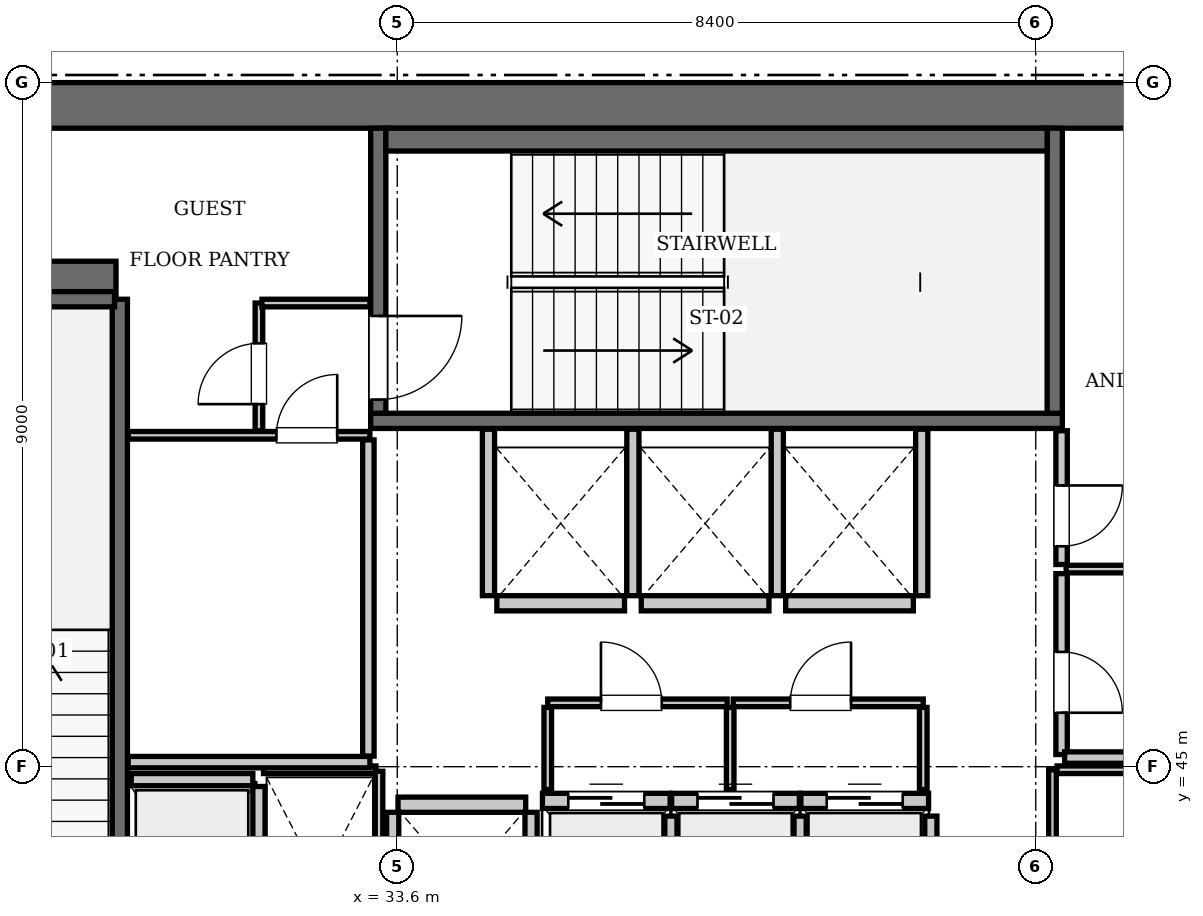
"""IFC4 building model, lengths in metres.
Left out: names, types, materials, properties, quantities, classifications, styles, units other than length and angle.
Written with IfcOpenShell. Run it as: python <this file> out.ifc"""

import sys

from ifc_helpers import new_model, si_unit, direction, frame, frame_2d, origin, place, context, subcontext, project, spatial, rectangle, extrude, element, fill, save


model = new_model("IFC4")
c1 = context("Model", 3, precision=1e-05, world=origin(), true_north=direction((0.0, 1.0)))
c2 = subcontext(c1, "Body", "Model", "MODEL_VIEW")
j1 = project(units=[si_unit("LENGTHUNIT", "METRE"), si_unit("PLANEANGLEUNIT", "RADIAN")], contexts=[c1])
p1 = place(None, origin())
s1 = spatial("IfcSite", under=j1, at=p1, CompositionType="ELEMENT")
p2 = place(p1, origin())
s2 = spatial("IfcBuilding", under=s1, at=p2, CompositionType="ELEMENT")
p3 = place(p2, frame((0.0, 0.0, 289.45)))
s3 = spatial("IfcBuildingStorey", under=s2, at=p3, CompositionType="ELEMENT", Elevation=289.45)
p4 = place(p3, frame((25.2, 53.7, 0.0), z_axis=(0.0, 0.0, 1.0), x_axis=(1.0, 0.0, 0.0)))
e1 = element("IfcWall", 1, at=p4, inside=s3, PredefinedType="SHEAR", context=c2, shape_type="SweptSolid", body=[
    extrude(rectangle(XDim=25.2, YDim=0.6, at=frame_2d((12.6, 0.0))), origin(), (0.0, 0.0, 1.0), 3.85),
])
p5 = place(p3, frame((25.8, 51.4, 0.0), z_axis=(0.0, 0.0, 1.0), x_axis=(1.0, 0.0, 0.0)))
e2 = element("IfcWall", 2, at=p5, inside=s3, PredefinedType="SHEAR", context=c2, shape_type="SweptSolid", body=[
    extrude(rectangle(XDim=4.1, YDim=0.5, at=frame_2d((2.05, 0.0))), origin(), (0.0, 0.0, 1.0), 3.85),
])
p6 = place(p3, frame((29.95, 42.0, 0.0), z_axis=(0.0, 0.0, 1.0), x_axis=(0.0, 1.0, 0.0)))
e3 = element("IfcWall", 3, at=p6, inside=s3, PredefinedType="SOLIDWALL", context=c2, shape_type="SweptSolid", body=[
    extrude(rectangle(XDim=9.15, YDim=0.2, at=frame_2d((4.575, 0.0))), origin(), (0.0, 0.0, 1.0), 3.61),
])
p7 = place(p3, frame((26.38, 51.15, 0.0), z_axis=(0.0, 0.0, 1.0), x_axis=(1.0, 0.0, 0.0)))
e4 = element("IfcWall", 4, at=p7, inside=s3, PredefinedType="SOLIDWALL", context=c2, shape_type="SweptSolid", body=[
    extrude(rectangle(XDim=3.5, YDim=0.2, at=frame_2d((1.75, 0.0))), origin(), (0.0, 0.0, 1.0), 3.61),
])
p8 = place(p3, frame((33.25, 49.55, 0.0), z_axis=(0.0, 0.0, 1.0), x_axis=(1.0, 0.0, 0.0)))
e5 = element("IfcWall", 5, at=p8, inside=s3, PredefinedType="SOLIDWALL", context=c2, shape_type="SweptSolid", body=[
    extrude(rectangle(XDim=9.1, YDim=0.2, at=frame_2d((4.55, 0.0))), origin(), (0.0, 0.0, 1.0), 3.61),
])
p9 = place(p3, frame((42.25, 49.65, 0.0), z_axis=(0.0, 0.0, 1.0), x_axis=(0.0, 1.0, 0.0)))
e6 = element("IfcWall", 6, at=p9, inside=s3, PredefinedType="SOLIDWALL", context=c2, shape_type="SweptSolid", body=[
    extrude(rectangle(XDim=3.75, YDim=0.2, at=frame_2d((1.875, 0.0))), origin(), (0.0, 0.0, 1.0), 3.61),
])
p10 = place(p3, frame((33.35, 49.65, 0.0), z_axis=(0.0, 0.0, 1.0), x_axis=(0.0, 1.0, 0.0)))
e7 = element("IfcWall", 7, at=p10, inside=s3, PredefinedType="SOLIDWALL", context=c2, shape_type="SweptSolid", body=[
    extrude(rectangle(XDim=3.75, YDim=0.2, at=frame_2d((1.875, 0.0))), origin(), (0.0, 0.0, 1.0), 3.61),
])
p11 = place(p10, frame((0.18, 0.0, 0.0)))
e8 = element("IfcOpeningElement", 8, at=p11, cuts=e7, PredefinedType="OPENING", context=c2, shape_type="SweptSolid", body=[
    extrude(rectangle(XDim=1.1, YDim=2.15, at=frame_2d((0.55, 1.075))), frame((0.0, 0.11, 0.0), z_axis=(0.0, -1.0, 0.0), x_axis=(1.0, 0.0, 0.0)), (0.0, 0.0, 1.0), 0.22),
])
p12 = place(p3, frame((33.45, 53.25, 0.0), z_axis=(0.0, 0.0, 1.0), x_axis=(1.0, 0.0, 0.0)))
e9 = element("IfcWall", 9, at=p12, inside=s3, PredefinedType="SOLIDWALL", context=c2, shape_type="SweptSolid", body=[
    extrude(rectangle(XDim=8.7, YDim=0.3, at=frame_2d((4.35, 0.0))), origin(), (0.0, 0.0, 1.0), 3.61),
])
p13 = place(p3, frame((35.51, 44.55, 0.0), z_axis=(0.0, 0.0, 1.0), x_axis=(1.0, 0.0, 0.0)))
e10 = element("IfcWall", 10, at=p13, inside=s3, PredefinedType="SOLIDWALL", context=c2, shape_type="SweptSolid", body=[
    extrude(rectangle(XDim=1.68, YDim=0.2, at=frame_2d((0.84, 0.0))), origin(), (0.0, 0.0, 1.0), 3.61),
])
p14 = place(p13, frame((0.34, 0.0, 0.0)))
e11 = element("IfcOpeningElement", 11, at=p14, cuts=e10, PredefinedType="OPENING", context=c2, shape_type="SweptSolid", body=[
    extrude(rectangle(XDim=1.0, YDim=2.15, at=frame_2d((0.5, 1.075))), frame((0.0, 0.11, 0.0), z_axis=(0.0, -1.0, 0.0), x_axis=(1.0, 0.0, 0.0)), (0.0, 0.0, 1.0), 0.22),
])
p15 = place(p3, frame((37.21, 44.55, 0.0), z_axis=(0.0, 0.0, 1.0), x_axis=(1.0, 0.0, 0.0)))
e12 = element("IfcWall", 12, at=p15, inside=s3, PredefinedType="SOLIDWALL", context=c2, shape_type="SweptSolid", body=[
    extrude(rectangle(XDim=1.68, YDim=0.2, at=frame_2d((0.84, 0.0))), origin(), (0.0, 0.0, 1.0), 3.61),
])
p16 = place(p15, frame((0.34, 0.0, 0.0)))
e13 = element("IfcOpeningElement", 13, at=p16, cuts=e12, PredefinedType="OPENING", context=c2, shape_type="SweptSolid", body=[
    extrude(rectangle(XDim=1.0, YDim=2.15, at=frame_2d((0.5, 1.075))), frame((0.0, 0.11, 0.0), z_axis=(0.0, -1.0, 0.0), x_axis=(1.0, 0.0, 0.0)), (0.0, 0.0, 1.0), 0.22),
])
p17 = place(p3, frame((38.91, 44.55, 0.0), z_axis=(0.0, 0.0, 1.0), x_axis=(1.0, 0.0, 0.0)))
e14 = element("IfcWall", 14, at=p17, inside=s3, PredefinedType="SOLIDWALL", context=c2, shape_type="SweptSolid", body=[
    extrude(rectangle(XDim=1.68, YDim=0.2, at=frame_2d((0.84, 0.0))), origin(), (0.0, 0.0, 1.0), 3.61),
])
p18 = place(p17, frame((0.34, 0.0, 0.0)))
e15 = element("IfcOpeningElement", 15, at=p18, cuts=e14, PredefinedType="OPENING", context=c2, shape_type="SweptSolid", body=[
    extrude(rectangle(XDim=1.0, YDim=2.15, at=frame_2d((0.5, 1.075))), frame((0.0, 0.11, 0.0), z_axis=(0.0, -1.0, 0.0), x_axis=(1.0, 0.0, 0.0)), (0.0, 0.0, 1.0), 0.22),
])
p19 = place(p3, frame((34.91, 47.15, 0.0), z_axis=(0.0, 0.0, 1.0), x_axis=(1.0, 0.0, 0.0)))
e16 = element("IfcWall", 16, at=p19, inside=s3, PredefinedType="SOLIDWALL", context=c2, shape_type="SweptSolid", body=[
    extrude(rectangle(XDim=1.68, YDim=0.2, at=frame_2d((0.84, 0.0))), origin(), (0.0, 0.0, 1.0), 3.61),
])
for number, where, z_axis, x_axis in (
    (17, (36.81, 47.15, 0.0), (0.0, 0.0, 1.0), (1.0, 0.0, 0.0)),
    (18, (38.71, 47.15, 0.0), (0.0, 0.0, 1.0), (1.0, 0.0, 0.0)),
    (19, (33.61, 44.5, 0.0), (0.0, 0.0, 1.0), (1.0, 0.0, 0.0)),
):
    element("IfcWall", number, at=place(p3, frame(where, z_axis=z_axis, x_axis=x_axis)), inside=s3, PredefinedType="SOLIDWALL", context=c2, shape_type="SweptSolid", body=[
        extrude(rectangle(XDim=1.68, YDim=0.2, at=frame_2d((0.84, 0.0))), origin(), (0.0, 0.0, 1.0), 3.61),
    ])
p20 = place(p3, frame((30.1, 44.83, 0.0), z_axis=(0.0, 0.0, 1.0), x_axis=(1.0, 0.0, 0.0)))
e20 = element("IfcWall", 20, at=p20, inside=s3, PredefinedType="SOLIDWALL", context=c2, shape_type="SweptSolid", body=[
    extrude(rectangle(XDim=1.6, YDim=0.16, at=frame_2d((0.8, 0.0))), origin(), (0.0, 0.0, 1.0), 3.61),
])
p21 = place(p3, frame((31.78, 42.0, 0.0), z_axis=(0.0, 0.0, 1.0), x_axis=(0.0, 1.0, 0.0)))
e21 = element("IfcWall", 21, at=p21, inside=s3, PredefinedType="SOLIDWALL", context=c2, shape_type="SweptSolid", body=[
    extrude(rectangle(XDim=2.74, YDim=0.16, at=frame_2d((1.37, 0.0))), origin(), (0.0, 0.0, 1.0), 3.61),
])
for number, where, z_axis, x_axis in (
    (22, (37.2, 42.0, 0.0), (0.0, 0.0, 1.0), (0.0, 1.0, 0.0)),
    (23, (38.9, 42.0, 0.0), (0.0, 0.0, 1.0), (0.0, 1.0, 0.0)),
    (24, (40.62, 42.0, 0.0), (0.0, 0.0, 1.0), (0.0, 1.0, 0.0)),
):
    element("IfcWall", number, at=place(p3, frame(where, z_axis=z_axis, x_axis=x_axis)), inside=s3, PredefinedType="SOLIDWALL", context=c2, shape_type="SweptSolid", body=[
        extrude(rectangle(XDim=2.35, YDim=0.16, at=frame_2d((1.175, 0.0))), origin(), (0.0, 0.0, 1.0), 3.61),
    ])
for number, where, z_axis, x_axis in (
    (25, (34.8, 47.25, 0.0), (0.0, 0.0, 1.0), (0.0, 1.0, 0.0)),
    (26, (36.7, 47.25, 0.0), (0.0, 0.0, 1.0), (0.0, 1.0, 0.0)),
    (27, (38.6, 47.25, 0.0), (0.0, 0.0, 1.0), (0.0, 1.0, 0.0)),
    (28, (40.5, 47.25, 0.0), (0.0, 0.0, 1.0), (0.0, 1.0, 0.0)),
):
    element("IfcWall", number, at=place(p3, frame(where, z_axis=z_axis, x_axis=x_axis)), inside=s3, PredefinedType="SOLIDWALL", context=c2, shape_type="SweptSolid", body=[
        extrude(rectangle(XDim=2.19, YDim=0.16, at=frame_2d((1.095, 0.0))), origin(), (0.0, 0.0, 1.0), 3.61),
    ])
for number, where, z_axis, x_axis in (
    (29, (33.54, 42.0, 0.0), (0.0, 0.0, 1.0), (0.0, 1.0, 0.0)),
    (30, (35.36, 42.0, 0.0), (0.0, 0.0, 1.0), (0.0, 1.0, 0.0)),
):
    element("IfcWall", number, at=place(p3, frame(where, z_axis=z_axis, x_axis=x_axis)), inside=s3, PredefinedType="SOLIDWALL", context=c2, shape_type="SweptSolid", body=[
        extrude(rectangle(XDim=2.4, YDim=0.16, at=frame_2d((1.2, 0.0))), origin(), (0.0, 0.0, 1.0), 3.61),
    ])
p22 = place(p3, frame((31.84, 44.96, 0.0), z_axis=(0.0, 0.0, 1.0), x_axis=(1.0, 0.0, 0.0)))
e31 = element("IfcWall", 31, at=p22, inside=s3, PredefinedType="PARTITIONING", context=c2, shape_type="SweptSolid", body=[
    extrude(rectangle(XDim=1.48, YDim=0.1, at=frame_2d((0.74, 0.0))), origin(), (0.0, 0.0, 1.0), 3.61),
])
p23 = place(p3, frame((33.36, 42.06, 0.0), z_axis=(0.0, 0.0, 1.0), x_axis=(0.0, 1.0, 0.0)))
e32 = element("IfcWall", 32, at=p23, inside=s3, PredefinedType="PARTITIONING", context=c2, shape_type="SweptSolid", body=[
    extrude(rectangle(XDim=2.88, YDim=0.1, at=frame_2d((1.44, 0.0))), origin(), (0.0, 0.0, 1.0), 3.61),
])
p24 = place(p3, frame((35.58, 45.84, 0.0), z_axis=(0.0, 0.0, 1.0), x_axis=(1.0, 0.0, 0.0)))
e33 = element("IfcWall", 33, at=p24, inside=s3, PredefinedType="PARTITIONING", context=c2, shape_type="SweptSolid", body=[
    extrude(rectangle(XDim=2.36, YDim=0.1, at=frame_2d((1.18, 0.0))), origin(), (0.0, 0.0, 1.0), 3.61),
])
p25 = place(p24, frame((0.7, 0.0, 0.0)))
e34 = element("IfcOpeningElement", 34, at=p25, cuts=e33, PredefinedType="OPENING", context=c2, shape_type="SweptSolid", body=[
    extrude(rectangle(XDim=0.8, YDim=2.05, at=frame_2d((0.4, 1.025))), frame((0.0, 0.06, 0.0), z_axis=(0.0, -1.0, 0.0), x_axis=(1.0, 0.0, 0.0)), (0.0, 0.0, 1.0), 0.12),
])
p26 = place(p3, frame((38.02, 45.84, 0.0), z_axis=(0.0, 0.0, 1.0), x_axis=(1.0, 0.0, 0.0)))
e35 = element("IfcWall", 35, at=p26, inside=s3, PredefinedType="PARTITIONING", context=c2, shape_type="SweptSolid", body=[
    extrude(rectangle(XDim=2.5, YDim=0.1, at=frame_2d((1.25, 0.0))), origin(), (0.0, 0.0, 1.0), 3.61),
])
p27 = place(p26, frame((0.75, 0.0, 0.0)))
e36 = element("IfcOpeningElement", 36, at=p27, cuts=e35, PredefinedType="OPENING", context=c2, shape_type="SweptSolid", body=[
    extrude(rectangle(XDim=0.8, YDim=2.05, at=frame_2d((0.4, 1.025))), frame((0.0, 0.06, 0.0), z_axis=(0.0, -1.0, 0.0), x_axis=(1.0, 0.0, 0.0)), (0.0, 0.0, 1.0), 0.12),
])
for number, where, z_axis, x_axis in (
    (37, (35.58, 44.7, 0.0), (0.0, 0.0, 1.0), (0.0, 1.0, 0.0)),
    (38, (37.98, 44.7, 0.0), (0.0, 0.0, 1.0), (0.0, 1.0, 0.0)),
    (39, (40.52, 44.7, 0.0), (0.0, 0.0, 1.0), (0.0, 1.0, 0.0)),
):
    element("IfcWall", number, at=place(p3, frame(where, z_axis=z_axis, x_axis=x_axis)), inside=s3, PredefinedType="PARTITIONING", context=c2, shape_type="SweptSolid", body=[
        extrude(rectangle(XDim=1.08, YDim=0.1, at=frame_2d((0.54, 0.0))), origin(), (0.0, 0.0, 1.0), 3.61),
    ])
p28 = place(p3, frame((42.22, 42.05, 0.0), z_axis=(0.0, 0.0, 1.0), x_axis=(0.0, 1.0, 0.0)))
e40 = element("IfcWall", 40, at=p28, inside=s3, PredefinedType="PARTITIONING", context=c2, shape_type="SweptSolid", body=[
    extrude(rectangle(XDim=2.91, YDim=0.1, at=frame_2d((1.455, 0.0))), origin(), (0.0, 0.0, 1.0), 3.61),
])
p29 = place(p28, frame((0.65, 0.0, 0.0)))
e41 = element("IfcOpeningElement", 41, at=p29, cuts=e40, PredefinedType="OPENING", context=c2, shape_type="SweptSolid", body=[
    extrude(rectangle(XDim=0.8, YDim=2.05, at=frame_2d((0.4, 1.025))), frame((0.0, 0.06, 0.0), z_axis=(0.0, -1.0, 0.0), x_axis=(1.0, 0.0, 0.0)), (0.0, 0.0, 1.0), 0.12),
])
p30 = place(p3, frame((42.28, 44.96, 0.0), z_axis=(0.0, 0.0, 1.0), x_axis=(1.0, 0.0, 0.0)))
e42 = element("IfcWall", 42, at=p30, inside=s3, PredefinedType="PARTITIONING", context=c2, shape_type="SweptSolid", body=[
    extrude(rectangle(XDim=1.3, YDim=0.1, at=frame_2d((0.65, 0.0))), origin(), (0.0, 0.0, 1.0), 3.61),
])
p31 = place(p3, frame((30.06, 45.06, 0.0), z_axis=(0.0, 0.0, 1.0), x_axis=(1.0, 0.0, 0.0)))
e43 = element("IfcWall", 43, at=p31, inside=s3, PredefinedType="PARTITIONING", context=c2, shape_type="SweptSolid", body=[
    extrude(rectangle(XDim=3.18, YDim=0.15, at=frame_2d((1.59, 0.0))), origin(), (0.0, 0.0, 1.0), 3.61),
])
p32 = place(p3, frame((33.22, 45.14, 0.0), z_axis=(0.0, 0.0, 1.0), x_axis=(0.0, 1.0, 0.0)))
e44 = element("IfcWall", 44, at=p32, inside=s3, PredefinedType="PARTITIONING", context=c2, shape_type="SweptSolid", body=[
    extrude(rectangle(XDim=4.16, YDim=0.15, at=frame_2d((2.08, 0.0))), origin(), (0.0, 0.0, 1.0), 3.61),
])
p33 = place(p3, frame((30.06, 49.36, 0.0), z_axis=(0.0, 0.0, 1.0), x_axis=(1.0, 0.0, 0.0)))
e45 = element("IfcWall", 45, at=p33, inside=s3, PredefinedType="PARTITIONING", context=c2, shape_type="SweptSolid", body=[
    extrude(rectangle(XDim=3.18, YDim=0.1, at=frame_2d((1.59, 0.0))), origin(), (0.0, 0.0, 1.0), 3.61),
])
p34 = place(p33, frame((1.95, 0.0, 0.0)))
e46 = element("IfcOpeningElement", 46, at=p34, cuts=e45, PredefinedType="OPENING", context=c2, shape_type="SweptSolid", body=[
    extrude(rectangle(XDim=0.8, YDim=2.05, at=frame_2d((0.4, 1.025))), frame((0.0, 0.06, 0.0), z_axis=(0.0, -1.0, 0.0), x_axis=(1.0, 0.0, 0.0)), (0.0, 0.0, 1.0), 0.12),
])
p35 = place(p3, frame((31.78, 49.42, 0.0), z_axis=(0.0, 0.0, 1.0), x_axis=(0.0, 1.0, 0.0)))
e47 = element("IfcWall", 47, at=p35, inside=s3, PredefinedType="PARTITIONING", context=c2, shape_type="SweptSolid", body=[
    extrude(rectangle(XDim=1.68, YDim=0.1, at=frame_2d((0.84, 0.0))), origin(), (0.0, 0.0, 1.0), 3.61),
])
p36 = place(p35, frame((0.35, 0.0, 0.0)))
e48 = element("IfcOpeningElement", 48, at=p36, cuts=e47, PredefinedType="OPENING", context=c2, shape_type="SweptSolid", body=[
    extrude(rectangle(XDim=0.8, YDim=2.05, at=frame_2d((0.4, 1.025))), frame((0.0, 0.06, 0.0), z_axis=(0.0, -1.0, 0.0), x_axis=(1.0, 0.0, 0.0)), (0.0, 0.0, 1.0), 0.12),
])
p37 = place(p3, frame((31.82, 51.1, 0.0), z_axis=(0.0, 0.0, 1.0), x_axis=(1.0, 0.0, 0.0)))
e49 = element("IfcWall", 49, at=p37, inside=s3, PredefinedType="PARTITIONING", context=c2, shape_type="SweptSolid", body=[
    extrude(rectangle(XDim=1.42, YDim=0.1, at=frame_2d((0.71, 0.0))), origin(), (0.0, 0.0, 1.0), 3.61),
])
p38 = place(p3, frame((42.34, 45.16, 0.0), z_axis=(0.0, 0.0, 1.0), x_axis=(0.0, 1.0, 0.0)))
e50 = element("IfcWall", 50, at=p38, inside=s3, PredefinedType="PARTITIONING", context=c2, shape_type="SweptSolid", body=[
    extrude(rectangle(XDim=2.38, YDim=0.15, at=frame_2d((1.19, 0.0))), origin(), (0.0, 0.0, 1.0), 3.61),
])
p39 = place(p38, frame((0.55, 0.0, 0.0)))
e51 = element("IfcOpeningElement", 51, at=p39, cuts=e50, PredefinedType="OPENING", context=c2, shape_type="SweptSolid", body=[
    extrude(rectangle(XDim=0.8, YDim=2.05, at=frame_2d((0.4, 1.025))), frame((0.0, 0.085, 0.0), z_axis=(0.0, -1.0, 0.0), x_axis=(1.0, 0.0, 0.0)), (0.0, 0.0, 1.0), 0.17),
])
p40 = place(p3, frame((42.34, 47.66, 0.0), z_axis=(0.0, 0.0, 1.0), x_axis=(0.0, 1.0, 0.0)))
e52 = element("IfcWall", 52, at=p40, inside=s3, PredefinedType="PARTITIONING", context=c2, shape_type="SweptSolid", body=[
    extrude(rectangle(XDim=1.76, YDim=0.15, at=frame_2d((0.88, 0.0))), origin(), (0.0, 0.0, 1.0), 3.61),
])
p41 = place(p40, frame((0.24, 0.0, 0.0)))
e53 = element("IfcOpeningElement", 53, at=p41, cuts=e52, PredefinedType="OPENING", context=c2, shape_type="SweptSolid", body=[
    extrude(rectangle(XDim=0.8, YDim=2.05, at=frame_2d((0.4, 1.025))), frame((0.0, 0.085, 0.0), z_axis=(0.0, -1.0, 0.0), x_axis=(1.0, 0.0, 0.0)), (0.0, 0.0, 1.0), 0.17),
])
p42 = place(p3, frame((42.4, 47.6, 0.0), z_axis=(0.0, 0.0, 1.0), x_axis=(1.0, 0.0, 0.0)))
e54 = element("IfcWall", 54, at=p42, inside=s3, PredefinedType="PARTITIONING", context=c2, shape_type="SweptSolid", body=[
    extrude(rectangle(XDim=3.1, YDim=0.1, at=frame_2d((1.55, 0.0))), origin(), (0.0, 0.0, 1.0), 3.61),
])
p43 = place(p3, frame((42.38, 45.12, 0.0), z_axis=(0.0, 0.0, 1.0), x_axis=(1.0, 0.0, 0.0)))
e55 = element("IfcWall", 55, at=p43, inside=s3, PredefinedType="PARTITIONING", context=c2, shape_type="SweptSolid", body=[
    extrude(rectangle(XDim=3.14, YDim=0.15, at=frame_2d((1.57, 0.0))), origin(), (0.0, 0.0, 1.0), 3.61),
])
p44 = place(p11, frame((1.1, 0.0, 0.0), z_axis=(0.0, 0.0, 1.0), x_axis=(-1.0, 0.0, 0.0)))
e56 = element("IfcDoor", 56, at=p44, inside=s3, OperationType="SINGLE_SWING_LEFT", PredefinedType="DOOR", context=c2, shape_type="SweptSolid", body=[
    extrude(rectangle(XDim=1.1, YDim=2.15, at=frame_2d((0.55, 1.075))), frame((0.0, 0.025, 0.0), z_axis=(0.0, -1.0, 0.0), x_axis=(1.0, 0.0, 0.0)), (0.0, 0.0, 1.0), 0.05),
])
fill(e8, e56)
p45 = place(p14, origin())
e57 = element("IfcDoor", 57, at=p45, inside=s3, OperationType="SLIDING_TO_LEFT", PredefinedType="DOOR", context=c2, shape_type="SweptSolid", body=[
    extrude(rectangle(XDim=1.0, YDim=2.15, at=frame_2d((0.5, 1.075))), frame((0.0, 0.025, 0.0), z_axis=(0.0, -1.0, 0.0), x_axis=(1.0, 0.0, 0.0)), (0.0, 0.0, 1.0), 0.05),
])
fill(e11, e57)
p46 = place(p16, origin())
e58 = element("IfcDoor", 58, at=p46, inside=s3, OperationType="SLIDING_TO_LEFT", PredefinedType="DOOR", context=c2, shape_type="SweptSolid", body=[
    extrude(rectangle(XDim=1.0, YDim=2.15, at=frame_2d((0.5, 1.075))), frame((0.0, 0.025, 0.0), z_axis=(0.0, -1.0, 0.0), x_axis=(1.0, 0.0, 0.0)), (0.0, 0.0, 1.0), 0.05),
])
fill(e13, e58)
p47 = place(p18, origin())
e59 = element("IfcDoor", 59, at=p47, inside=s3, OperationType="SLIDING_TO_LEFT", PredefinedType="DOOR", context=c2, shape_type="SweptSolid", body=[
    extrude(rectangle(XDim=1.0, YDim=2.15, at=frame_2d((0.5, 1.075))), frame((0.0, 0.025, 0.0), z_axis=(0.0, -1.0, 0.0), x_axis=(1.0, 0.0, 0.0)), (0.0, 0.0, 1.0), 0.05),
])
fill(e15, e59)
p48 = place(p25, origin())
e60 = element("IfcDoor", 60, at=p48, inside=s3, OperationType="SINGLE_SWING_LEFT", PredefinedType="DOOR", context=c2, shape_type="SweptSolid", body=[
    extrude(rectangle(XDim=0.8, YDim=2.05, at=frame_2d((0.4, 1.025))), frame((0.0, 0.025, 0.0), z_axis=(0.0, -1.0, 0.0), x_axis=(1.0, 0.0, 0.0)), (0.0, 0.0, 1.0), 0.05),
])
fill(e34, e60)
p49 = place(p27, origin())
e61 = element("IfcDoor", 61, at=p49, inside=s3, OperationType="SINGLE_SWING_RIGHT", PredefinedType="DOOR", context=c2, shape_type="SweptSolid", body=[
    extrude(rectangle(XDim=0.8, YDim=2.05, at=frame_2d((0.4, 1.025))), frame((0.0, 0.025, 0.0), z_axis=(0.0, -1.0, 0.0), x_axis=(1.0, 0.0, 0.0)), (0.0, 0.0, 1.0), 0.05),
])
fill(e36, e61)
p50 = place(p34, origin())
e62 = element("IfcDoor", 62, at=p50, inside=s3, OperationType="SINGLE_SWING_RIGHT", PredefinedType="DOOR", context=c2, shape_type="SweptSolid", body=[
    extrude(rectangle(XDim=0.8, YDim=2.05, at=frame_2d((0.4, 1.025))), frame((0.0, 0.025, 0.0), z_axis=(0.0, -1.0, 0.0), x_axis=(1.0, 0.0, 0.0)), (0.0, 0.0, 1.0), 0.05),
])
fill(e46, e62)
p51 = place(p36, origin())
e63 = element("IfcDoor", 63, at=p51, inside=s3, OperationType="SINGLE_SWING_LEFT", PredefinedType="DOOR", context=c2, shape_type="SweptSolid", body=[
    extrude(rectangle(XDim=0.8, YDim=2.05, at=frame_2d((0.4, 1.025))), frame((0.0, 0.025, 0.0), z_axis=(0.0, -1.0, 0.0), x_axis=(1.0, 0.0, 0.0)), (0.0, 0.0, 1.0), 0.05),
])
fill(e48, e63)
p52 = place(p39, frame((0.8, 0.0, 0.0), z_axis=(0.0, 0.0, 1.0), x_axis=(-1.0, 0.0, 0.0)))
e64 = element("IfcDoor", 64, at=p52, inside=s3, OperationType="SINGLE_SWING_RIGHT", PredefinedType="DOOR", context=c2, shape_type="SweptSolid", body=[
    extrude(rectangle(XDim=0.8, YDim=2.05, at=frame_2d((0.4, 1.025))), frame((0.0, 0.025, 0.0), z_axis=(0.0, -1.0, 0.0), x_axis=(1.0, 0.0, 0.0)), (0.0, 0.0, 1.0), 0.05),
])
fill(e51, e64)
p53 = place(p41, frame((0.8, 0.0, 0.0), z_axis=(0.0, 0.0, 1.0), x_axis=(-1.0, 0.0, 0.0)))
e65 = element("IfcDoor", 65, at=p53, inside=s3, OperationType="SINGLE_SWING_LEFT", PredefinedType="DOOR", context=c2, shape_type="SweptSolid", body=[
    extrude(rectangle(XDim=0.8, YDim=2.05, at=frame_2d((0.4, 1.025))), frame((0.0, 0.025, 0.0), z_axis=(0.0, -1.0, 0.0), x_axis=(1.0, 0.0, 0.0)), (0.0, 0.0, 1.0), 0.05),
])
fill(e53, e65)
save(model, sys.argv[1])
